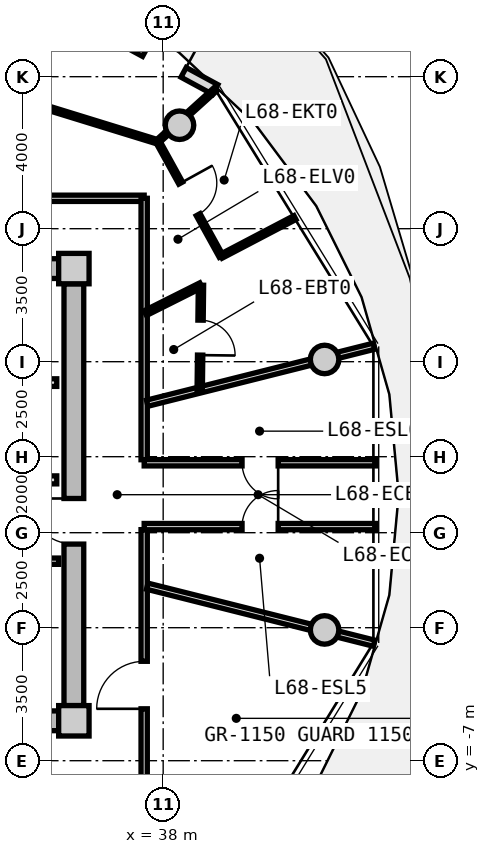
"""IFC4 building model, lengths in metres.
Left out: names, types, materials, properties, quantities, classifications, styles, units other than length and angle.
Written with IfcOpenShell. Run it as: python <this file> out.ifc"""

import sys

from ifc_helpers import new_model, si_unit, direction, frame, frame_2d, origin, origin_2d, place, context, subcontext, project, spatial, rectangle, circle, extrude, source, transform, mapped, element, fill, save


model = new_model("IFC4")
c1 = context("Model", 3, precision=1e-05, world=origin(), true_north=direction((0.0, 1.0)))
c2 = subcontext(c1, "Body", "Model", "MODEL_VIEW")
j1 = project(units=[si_unit("LENGTHUNIT", "METRE"), si_unit("PLANEANGLEUNIT", "RADIAN")], contexts=[c1])
p1 = place(None, origin())
s1 = spatial("IfcSite", under=j1, at=p1, CompositionType="ELEMENT")
p2 = place(p1, origin())
s2 = spatial("IfcBuilding", under=s1, at=p2, CompositionType="ELEMENT")
p3 = place(p2, frame((0.0, 0.0, 220.0)))
s3 = spatial("IfcBuildingStorey", under=s2, at=p3, CompositionType="ELEMENT", Elevation=220.0)
m1 = source(origin(), c2, "Body", "SweptSolid", [
    extrude(rectangle(XDim=0.8, YDim=0.8, at=origin_2d()), origin(), (0.0, 0.0, 1.0), 3.05),
])
for number, where, z_axis, x_axis in (
    (1, (35.65, -5.95, 0.0), (0.0, 0.0, 1.0), (1.0, 0.0, 0.0)),
    (2, (35.65, 5.95, 0.0), (0.0, 0.0, 1.0), (1.0, 0.0, 0.0)),
):
    element("IfcColumn", number, at=place(p3, frame(where, z_axis=z_axis, x_axis=x_axis)), inside=s3, PredefinedType="COLUMN", context=c2, shape_type="MappedRepresentation", body=[
        mapped(m1, transform((0.0, 0.0, 0.0), x_axis=(1.0, 0.0, 0.0), y_axis=(0.0, 1.0, 0.0), z_axis=(0.0, 0.0, 1.0), scale=1.0)),
    ])
m2 = source(origin(), c2, "Body", "SweptSolid", [
    extrude(rectangle(XDim=14.5, YDim=0.52, at=frame_2d((7.25, 0.0))), origin(), (0.0, 0.0, 1.0), 2.76),
])
for number, where, z_axis, x_axis in (
    (3, (20.75, 5.95, 0.0), (0.0, 0.0, 1.0), (1.0, 0.0, 0.0)),
    (4, (35.25, -5.95, 0.0), (0.0, 0.0, 1.0), (-1.0, 0.0, 0.0)),
):
    element("IfcWall", number, at=place(p3, frame(where, z_axis=z_axis, x_axis=x_axis)), inside=s3, PredefinedType="SHEAR", context=c2, shape_type="MappedRepresentation", body=[
        mapped(m2, transform((0.0, 0.0, 0.0), x_axis=(1.0, 0.0, 0.0), y_axis=(0.0, 1.0, 0.0), z_axis=(0.0, 0.0, 1.0), scale=1.0)),
    ])
m3 = source(origin(), c2, "Body", "SweptSolid", [
    extrude(rectangle(XDim=11.1, YDim=0.52, at=frame_2d((5.55, 0.0))), origin(), (0.0, 0.0, 1.0), 2.76),
])
p4 = place(p3, frame((35.65, 5.55, 0.0), z_axis=(0.0, 0.0, 1.0), x_axis=(0.0, -1.0, 0.0)))
e5 = element("IfcWall", 5, at=p4, inside=s3, PredefinedType="SHEAR", context=c2, shape_type="MappedRepresentation", body=[
    mapped(m3, transform((0.0, 0.0, 0.0), x_axis=(1.0, 0.0, 0.0), y_axis=(0.0, 1.0, 0.0), z_axis=(0.0, 0.0, 1.0), scale=1.0)),
])
p5 = place(p4, frame((5.65, 0.0, 0.0)))
e6 = element("IfcOpeningElement", 6, at=p5, cuts=e5, PredefinedType="OPENING", context=c2, shape_type="SweptSolid", body=[
    extrude(rectangle(XDim=1.2, YDim=2.15, at=frame_2d((0.6, 1.075))), frame((0.0, 0.27, 0.0), z_axis=(0.0, -1.0, 0.0), x_axis=(1.0, 0.0, 0.0)), (0.0, 0.0, 1.0), 0.54),
])
m4 = source(origin(), c2, "Body", "SweptSolid", [
    extrude(circle(Radius=0.375, at=origin_2d()), origin(), (0.0, 0.0, 1.0), 3.05),
])
for number, where, z_axis, x_axis in (
    (7, (42.247, 3.559, 0.0), (0.0, 0.0, 1.0), (1.0, 0.0, 0.0)),
    (8, (38.43, 9.723, 0.0), (0.0, 0.0, 1.0), (1.0, 0.0, 0.0)),
    (9, (42.247, -3.559, 0.0), (0.0, 0.0, 1.0), (1.0, 0.0, 0.0)),
):
    element("IfcColumn", number, at=place(p3, frame(where, z_axis=z_axis, x_axis=x_axis)), inside=s3, PredefinedType="COLUMN", context=c2, shape_type="MappedRepresentation", body=[
        mapped(m4, transform((0.0, 0.0, 0.0), x_axis=(1.0, 0.0, 0.0), y_axis=(0.0, 1.0, 0.0), z_axis=(0.0, 0.0, 1.0), scale=1.0)),
    ])
m5 = source(origin(), c2, "Body", "SweptSolid", [
    extrude(rectangle(XDim=8.197, YDim=0.29, at=frame_2d((4.099, 0.0))), origin(), (0.0, 0.0, 1.0), 2.76),
])
p6 = place(p3, frame((32.162, 14.566, 0.0), z_axis=(0.0, 0.0, 1.0), x_axis=(0.879369910001, -0.476139224791, 0.0)))
e10 = element("IfcWall", 10, at=p6, inside=s3, PredefinedType="SOLIDWALL", context=c2, shape_type="MappedRepresentation", body=[
    mapped(m5, transform((0.0, 0.0, 0.0), x_axis=(1.0, 0.0, 0.0), y_axis=(0.0, 1.0, 0.0), z_axis=(0.0, 0.0, 1.0), scale=1.0)),
])
p7 = place(p6, frame((6.1, 0.0, 0.0)))
e11 = element("IfcOpeningElement", 11, at=p7, cuts=e10, PredefinedType="OPENING", context=c2, shape_type="SweptSolid", body=[
    extrude(rectangle(XDim=1.15, YDim=2.25, at=frame_2d((0.575, 1.125))), frame((0.0, 0.155, 0.0), z_axis=(0.0, -1.0, 0.0), x_axis=(1.0, 0.0, 0.0)), (0.0, 0.0, 1.0), 0.31),
])
p8 = place(p6, frame((0.85, 0.0, 0.85)))
e12 = element("IfcOpeningElement", 12, at=p8, cuts=e10, PredefinedType="OPENING", context=c2, shape_type="SweptSolid", body=[
    extrude(rectangle(XDim=1.2, YDim=1.5, at=frame_2d((0.6, 0.75))), frame((0.0, 0.155, 0.0), z_axis=(0.0, -1.0, 0.0), x_axis=(1.0, 0.0, 0.0)), (0.0, 0.0, 1.0), 0.31),
])
m6 = source(origin(), c2, "Body", "SweptSolid", [
    extrude(rectangle(XDim=3.2, YDim=0.2, at=frame_2d((1.6, 0.0))), origin(), (0.0, 0.0, 1.0), 2.745),
])
p9 = place(p3, frame((32.0, 2.95, 0.0), z_axis=(0.0, 0.0, 1.0), x_axis=(1.0, 0.0, 0.0)))
e13 = element("IfcWall", 13, at=p9, inside=s3, PredefinedType="PARTITIONING", context=c2, shape_type="MappedRepresentation", body=[
    mapped(m6, transform((0.0, 0.0, 0.0), x_axis=(1.0, 0.0, 0.0), y_axis=(0.0, 1.0, 0.0), z_axis=(0.0, 0.0, 1.0), scale=1.0)),
])
m7 = source(origin(), c2, "Body", "SweptSolid", [
    extrude(rectangle(XDim=6.66, YDim=0.21, at=frame_2d((3.33, 0.0))), origin(), (0.0, 0.0, 1.0), 2.745),
])
p10 = place(p3, frame((28.54, 0.39, 0.0), z_axis=(0.0, 0.0, 1.0), x_axis=(1.0, 0.0, 0.0)))
e14 = element("IfcWall", 14, at=p10, inside=s3, PredefinedType="PARTITIONING", context=c2, shape_type="MappedRepresentation", body=[
    mapped(m7, transform((0.0, 0.0, 0.0), x_axis=(1.0, 0.0, 0.0), y_axis=(0.0, 1.0, 0.0), z_axis=(0.0, 0.0, 1.0), scale=1.0)),
])
p11 = place(p10, frame((1.0, 0.0, 0.0)))
e15 = element("IfcOpeningElement", 15, at=p11, cuts=e14, PredefinedType="OPENING", context=c2, shape_type="SweptSolid", body=[
    extrude(rectangle(XDim=1.2, YDim=2.15, at=frame_2d((0.6, 1.075))), frame((0.0, 0.115, 0.0), z_axis=(0.0, -1.0, 0.0), x_axis=(1.0, 0.0, 0.0)), (0.0, 0.0, 1.0), 0.23),
])
m8 = source(origin(), c2, "Body", "SweptSolid", [
    extrude(rectangle(XDim=2.7, YDim=0.165, at=frame_2d((1.35, 0.0))), origin(), (0.0, 0.0, 1.0), 2.745),
])
p12 = place(p3, frame((32.55, -1.75, 0.0), z_axis=(0.0, 0.0, 1.0), x_axis=(1.0, 0.0, 0.0)))
e16 = element("IfcWall", 16, at=p12, inside=s3, PredefinedType="PARTITIONING", context=c2, shape_type="MappedRepresentation", body=[
    mapped(m8, transform((0.0, 0.0, 0.0), x_axis=(1.0, 0.0, 0.0), y_axis=(0.0, 1.0, 0.0), z_axis=(0.0, 0.0, 1.0), scale=1.0)),
])
p13 = place(p12, frame((0.222, 0.0, 0.0)))
e17 = element("IfcOpeningElement", 17, at=p13, cuts=e16, PredefinedType="OPENING", context=c2, shape_type="SweptSolid", body=[
    extrude(rectangle(XDim=0.925, YDim=2.1, at=frame_2d((0.462, 1.05))), frame((0.0, 0.093, 0.0), z_axis=(0.0, -1.0, 0.0), x_axis=(1.0, 0.0, 0.0)), (0.0, 0.0, 1.0), 0.185),
])
p14 = place(p12, frame((1.522, 0.0, 0.0)))
e18 = element("IfcOpeningElement", 18, at=p14, cuts=e16, PredefinedType="OPENING", context=c2, shape_type="SweptSolid", body=[
    extrude(rectangle(XDim=0.925, YDim=2.1, at=frame_2d((0.462, 1.05))), frame((0.0, 0.093, 0.0), z_axis=(0.0, -1.0, 0.0), x_axis=(1.0, 0.0, 0.0)), (0.0, 0.0, 1.0), 0.185),
])
m9 = source(origin(), c2, "Body", "SweptSolid", [
    extrude(rectangle(XDim=8.58, YDim=0.165, at=frame_2d((4.29, 0.0))), origin(), (0.0, 0.0, 1.0), 2.745),
])
p15 = place(p3, frame((28.92, 7.8, 0.0), z_axis=(0.0, 0.0, 1.0), x_axis=(1.0, 0.0, 0.0)))
e19 = element("IfcWall", 19, at=p15, inside=s3, PredefinedType="PARTITIONING", context=c2, shape_type="MappedRepresentation", body=[
    mapped(m9, transform((0.0, 0.0, 0.0), x_axis=(1.0, 0.0, 0.0), y_axis=(0.0, 1.0, 0.0), z_axis=(0.0, 0.0, 1.0), scale=1.0)),
])
p16 = place(p15, frame((4.32, 0.0, 0.0)))
e20 = element("IfcOpeningElement", 20, at=p16, cuts=e19, PredefinedType="OPENING", context=c2, shape_type="SweptSolid", body=[
    extrude(rectangle(XDim=1.05, YDim=2.15, at=frame_2d((0.525, 1.075))), frame((0.0, 0.093, 0.0), z_axis=(0.0, -1.0, 0.0), x_axis=(1.0, 0.0, 0.0)), (0.0, 0.0, 1.0), 0.185),
])
m10 = source(origin(), c2, "Body", "SweptSolid", [
    extrude(rectangle(XDim=6.88, YDim=0.165, at=frame_2d((3.44, 0.0))), origin(), (0.0, 0.0, 1.0), 2.745),
])
p17 = place(p3, frame((37.5, 7.8, 0.0), z_axis=(0.0, 0.0, 1.0), x_axis=(0.0, -1.0, 0.0)))
e21 = element("IfcWall", 21, at=p17, inside=s3, PredefinedType="PARTITIONING", context=c2, shape_type="MappedRepresentation", body=[
    mapped(m10, transform((0.0, 0.0, 0.0), x_axis=(1.0, 0.0, 0.0), y_axis=(0.0, 1.0, 0.0), z_axis=(0.0, 0.0, 1.0), scale=1.0)),
])
p18 = place(p3, frame((37.5, -0.92, 0.0), z_axis=(0.0, 0.0, 1.0), x_axis=(0.0, -1.0, 0.0)))
e22 = element("IfcWall", 22, at=p18, inside=s3, PredefinedType="PARTITIONING", context=c2, shape_type="MappedRepresentation", body=[
    mapped(m10, transform((0.0, 0.0, 0.0), x_axis=(1.0, 0.0, 0.0), y_axis=(0.0, 1.0, 0.0), z_axis=(0.0, 0.0, 1.0), scale=1.0)),
])
p19 = place(p18, frame((3.464, 0.0, 0.0)))
e23 = element("IfcOpeningElement", 23, at=p19, cuts=e22, PredefinedType="OPENING", context=c2, shape_type="SweptSolid", body=[
    extrude(rectangle(XDim=1.25, YDim=2.2, at=frame_2d((0.625, 1.1))), frame((0.0, 0.093, 0.0), z_axis=(0.0, -1.0, 0.0), x_axis=(1.0, 0.0, 0.0)), (0.0, 0.0, 1.0), 0.185),
])
m11 = source(origin(), c2, "Body", "SweptSolid", [
    extrude(rectangle(XDim=6.157, YDim=0.165, at=frame_2d((3.079, 0.0))), origin(), (0.0, 0.0, 1.0), 2.345),
])
for number, where, z_axis, x_axis in (
    (24, (37.58, -2.407, 0.0), (0.0, 0.0, 1.0), (0.97, -0.244, 0.0)),
    (25, (37.58, 2.407, 0.0), (0.0, 0.0, 1.0), (0.97, 0.244, 0.0)),
):
    element("IfcWall", number, at=place(p3, frame(where, z_axis=z_axis, x_axis=x_axis)), inside=s3, PredefinedType="PARTITIONING", context=c2, shape_type="MappedRepresentation", body=[
        mapped(m11, transform((0.0, 0.0, 0.0), x_axis=(1.0, 0.0, 0.0), y_axis=(0.0, 1.0, 0.0), z_axis=(0.0, 0.0, 1.0), scale=1.0)),
    ])
m12 = source(origin(), c2, "Body", "SweptSolid", [
    extrude(rectangle(XDim=6.101, YDim=0.165, at=frame_2d((3.051, 0.0))), origin(), (0.0, 0.0, 1.0), 2.745),
])
p20 = place(p3, frame((37.5, 0.84, 0.0), z_axis=(0.0, 0.0, 1.0), x_axis=(1.0, 0.0, 0.0)))
e26 = element("IfcWall", 26, at=p20, inside=s3, PredefinedType="PARTITIONING", context=c2, shape_type="MappedRepresentation", body=[
    mapped(m12, transform((0.0, 0.0, 0.0), x_axis=(1.0, 0.0, 0.0), y_axis=(0.0, 1.0, 0.0), z_axis=(0.0, 0.0, 1.0), scale=1.0)),
])
p21 = place(p20, frame((2.576, 0.0, 0.0)))
e27 = element("IfcOpeningElement", 27, at=p21, cuts=e26, PredefinedType="OPENING", context=c2, shape_type="SweptSolid", body=[
    extrude(rectangle(XDim=0.95, YDim=2.1, at=frame_2d((0.475, 1.05))), frame((0.0, 0.093, 0.0), z_axis=(0.0, -1.0, 0.0), x_axis=(1.0, 0.0, 0.0)), (0.0, 0.0, 1.0), 0.185),
])
p22 = place(p3, frame((43.601, -0.84, 0.0), z_axis=(0.0, 0.0, 1.0), x_axis=(-1.0, 0.0, 0.0)))
e28 = element("IfcWall", 28, at=p22, inside=s3, PredefinedType="PARTITIONING", context=c2, shape_type="MappedRepresentation", body=[
    mapped(m12, transform((0.0, 0.0, 0.0), x_axis=(1.0, 0.0, 0.0), y_axis=(0.0, 1.0, 0.0), z_axis=(0.0, 0.0, 1.0), scale=1.0)),
])
p23 = place(p22, frame((2.576, 0.0, 0.0)))
e29 = element("IfcOpeningElement", 29, at=p23, cuts=e28, PredefinedType="OPENING", context=c2, shape_type="SweptSolid", body=[
    extrude(rectangle(XDim=0.95, YDim=2.1, at=frame_2d((0.475, 1.05))), frame((0.0, 0.093, 0.0), z_axis=(0.0, -1.0, 0.0), x_axis=(1.0, 0.0, 0.0)), (0.0, 0.0, 1.0), 0.185),
])
m13 = source(origin(), c2, "Body", "SweptSolid", [
    extrude(rectangle(XDim=6.919, YDim=0.115, at=frame_2d((3.459, 0.0))), origin(), (0.0, 0.0, 1.0), 2.745),
])
p24 = place(p3, frame((37.849, 9.287, 0.0), z_axis=(0.0, 0.0, 1.0), x_axis=(-0.955678249072, 0.294413118341, 0.0)))
e30 = element("IfcWall", 30, at=p24, inside=s3, PredefinedType="PARTITIONING", context=c2, shape_type="MappedRepresentation", body=[
    mapped(m13, transform((0.0, 0.0, 0.0), x_axis=(1.0, 0.0, 0.0), y_axis=(0.0, 1.0, 0.0), z_axis=(0.0, 0.0, 1.0), scale=1.0)),
])
p25 = place(p24, frame((2.985, 0.0, 0.0)))
e31 = element("IfcOpeningElement", 31, at=p25, cuts=e30, PredefinedType="OPENING", context=c2, shape_type="SweptSolid", body=[
    extrude(rectangle(XDim=0.95, YDim=2.1, at=frame_2d((0.475, 1.05))), frame((0.0, 0.067, 0.0), z_axis=(0.0, -1.0, 0.0), x_axis=(1.0, 0.0, 0.0)), (0.0, 0.0, 1.0), 0.135),
])
m14 = source(origin(), c2, "Body", "SweptSolid", [
    extrude(rectangle(XDim=2.072, YDim=0.115, at=frame_2d((1.036, 0.0))), origin(), (0.0, 0.0, 1.0), 2.385),
])
p26 = place(p3, frame((37.849, 9.287, 0.0), z_axis=(0.0, 0.0, 1.0), x_axis=(0.741410125356, 0.671052178314, 0.0)))
e32 = element("IfcWall", 32, at=p26, inside=s3, PredefinedType="PARTITIONING", context=c2, shape_type="MappedRepresentation", body=[
    mapped(m14, transform((0.0, 0.0, 0.0), x_axis=(1.0, 0.0, 0.0), y_axis=(0.0, 1.0, 0.0), z_axis=(0.0, 0.0, 1.0), scale=1.0)),
])
m15 = source(origin(), c2, "Body", "SweptSolid", [
    extrude(rectangle(XDim=1.638, YDim=0.14, at=frame_2d((0.819, 0.0))), origin(), (0.0, 0.0, 1.0), 2.745),
])
p27 = place(p3, frame((37.53, 4.778, 0.0), z_axis=(0.0, 0.0, 1.0), x_axis=(0.893919977945, 0.448226586707, 0.0)))
e33 = element("IfcWall", 33, at=p27, inside=s3, PredefinedType="PARTITIONING", context=c2, shape_type="MappedRepresentation", body=[
    mapped(m15, transform((0.0, 0.0, 0.0), x_axis=(1.0, 0.0, 0.0), y_axis=(0.0, 1.0, 0.0), z_axis=(0.0, 0.0, 1.0), scale=1.0)),
])
m16 = source(origin(), c2, "Body", "SweptSolid", [
    extrude(rectangle(XDim=2.759, YDim=0.14, at=frame_2d((1.379, 0.0))), origin(), (0.0, 0.0, 1.0), 2.745),
])
p28 = place(p3, frame((38.995, 5.513, 0.0), z_axis=(0.0, 0.0, 1.0), x_axis=(-0.01194710728, -0.999928630767, 0.0)))
e34 = element("IfcWall", 34, at=p28, inside=s3, PredefinedType="PARTITIONING", context=c2, shape_type="MappedRepresentation", body=[
    mapped(m16, transform((0.0, 0.0, 0.0), x_axis=(1.0, 0.0, 0.0), y_axis=(0.0, 1.0, 0.0), z_axis=(0.0, 0.0, 1.0), scale=1.0)),
])
p29 = place(p28, frame((0.919, 0.0, 0.0)))
e35 = element("IfcOpeningElement", 35, at=p29, cuts=e34, PredefinedType="OPENING", context=c2, shape_type="SweptSolid", body=[
    extrude(rectangle(XDim=0.92, YDim=2.1, at=frame_2d((0.46, 1.05))), frame((0.0, 0.08, 0.0), z_axis=(0.0, -1.0, 0.0), x_axis=(1.0, 0.0, 0.0)), (0.0, 0.0, 1.0), 0.16),
])
m17 = source(origin(), c2, "Body", "SweptSolid", [
    extrude(rectangle(XDim=2.193, YDim=0.115, at=frame_2d((1.097, 0.0))), origin(), (0.0, 0.0, 1.0), 2.745),
])
p30 = place(p3, frame((39.525, 6.275, 0.0), z_axis=(0.0, 0.0, 1.0), x_axis=(0.885783595046, 0.464098505435, 0.0)))
e36 = element("IfcWall", 36, at=p30, inside=s3, PredefinedType="PARTITIONING", context=c2, shape_type="MappedRepresentation", body=[
    mapped(m17, transform((0.0, 0.0, 0.0), x_axis=(1.0, 0.0, 0.0), y_axis=(0.0, 1.0, 0.0), z_axis=(0.0, 0.0, 1.0), scale=1.0)),
])
m18 = source(origin(), c2, "Body", "SweptSolid", [
    extrude(rectangle(XDim=3.45, YDim=0.115, at=frame_2d((1.725, 0.0))), origin(), (0.0, 0.0, 1.0), 2.745),
])
p31 = place(p3, frame((39.525, 6.275, 0.0), z_axis=(0.0, 0.0, 1.0), x_axis=(-0.483659007882, 0.875256513312, 0.0)))
e37 = element("IfcWall", 37, at=p31, inside=s3, PredefinedType="PARTITIONING", context=c2, shape_type="MappedRepresentation", body=[
    mapped(m18, transform((0.0, 0.0, 0.0), x_axis=(1.0, 0.0, 0.0), y_axis=(0.0, 1.0, 0.0), z_axis=(0.0, 0.0, 1.0), scale=1.0)),
])
p32 = place(p31, frame((1.25, 0.0, 0.0)))
e38 = element("IfcOpeningElement", 38, at=p32, cuts=e37, PredefinedType="OPENING", context=c2, shape_type="SweptSolid", body=[
    extrude(rectangle(XDim=0.95, YDim=2.1, at=frame_2d((0.475, 1.05))), frame((0.0, 0.067, 0.0), z_axis=(0.0, -1.0, 0.0), x_axis=(1.0, 0.0, 0.0)), (0.0, 0.0, 1.0), 0.135),
])
m19 = source(origin(), c2, "Body", "SweptSolid", [
    extrude(rectangle(XDim=1.15, YDim=2.25, at=frame_2d((0.575, 1.125))), frame((0.0, 0.025, 0.0), z_axis=(0.0, -1.0, 0.0), x_axis=(1.0, 0.0, 0.0)), (0.0, 0.0, 1.0), 0.05),
])
p33 = place(p7, origin())
e39 = element("IfcDoor", 39, at=p33, inside=s3, OperationType="SINGLE_SWING_RIGHT", PredefinedType="DOOR", context=c2, shape_type="MappedRepresentation", body=[
    mapped(m19, transform((0.0, 0.0, 0.0), x_axis=(1.0, 0.0, 0.0), y_axis=(0.0, 1.0, 0.0), z_axis=(0.0, 0.0, 1.0), scale=1.0)),
])
fill(e11, e39)
m20 = source(origin(), c2, "Body", "SweptSolid", [
    extrude(rectangle(XDim=1.2, YDim=2.15, at=frame_2d((0.6, 1.075))), frame((0.0, 0.025, 0.0), z_axis=(0.0, -1.0, 0.0), x_axis=(1.0, 0.0, 0.0)), (0.0, 0.0, 1.0), 0.05),
])
p34 = place(p5, frame((1.2, 0.0, 0.0), z_axis=(0.0, 0.0, 1.0), x_axis=(-1.0, 0.0, 0.0)))
e40 = element("IfcDoor", 40, at=p34, inside=s3, OperationType="SINGLE_SWING_RIGHT", PredefinedType="DOOR", context=c2, shape_type="MappedRepresentation", body=[
    mapped(m20, transform((0.0, 0.0, 0.0), x_axis=(1.0, 0.0, 0.0), y_axis=(0.0, 1.0, 0.0), z_axis=(0.0, 0.0, 1.0), scale=1.0)),
])
fill(e6, e40)
m21 = source(origin(), c2, "Body", "SweptSolid", [
    extrude(rectangle(XDim=0.95, YDim=2.1, at=frame_2d((0.475, 1.05))), frame((0.0, 0.025, 0.0), z_axis=(0.0, -1.0, 0.0), x_axis=(1.0, 0.0, 0.0)), (0.0, 0.0, 1.0), 0.05),
])
p35 = place(p23, frame((0.95, 0.0, 0.0), z_axis=(0.0, 0.0, 1.0), x_axis=(-1.0, 0.0, 0.0)))
e41 = element("IfcDoor", 41, at=p35, inside=s3, OperationType="SINGLE_SWING_RIGHT", PredefinedType="DOOR", context=c2, shape_type="MappedRepresentation", body=[
    mapped(m21, transform((0.0, 0.0, 0.0), x_axis=(1.0, 0.0, 0.0), y_axis=(0.0, 1.0, 0.0), z_axis=(0.0, 0.0, 1.0), scale=1.0)),
])
fill(e29, e41)
p36 = place(p21, frame((0.95, 0.0, 0.0), z_axis=(0.0, 0.0, 1.0), x_axis=(-1.0, 0.0, 0.0)))
e42 = element("IfcDoor", 42, at=p36, inside=s3, OperationType="SINGLE_SWING_LEFT", PredefinedType="DOOR", context=c2, shape_type="MappedRepresentation", body=[
    mapped(m21, transform((0.0, 0.0, 0.0), x_axis=(1.0, 0.0, 0.0), y_axis=(0.0, 1.0, 0.0), z_axis=(0.0, 0.0, 1.0), scale=1.0)),
])
fill(e27, e42)
m22 = source(origin(), c2, "Body", "SweptSolid", [
    extrude(rectangle(XDim=0.92, YDim=2.1, at=frame_2d((0.46, 1.05))), frame((0.0, 0.025, 0.0), z_axis=(0.0, -1.0, 0.0), x_axis=(1.0, 0.0, 0.0)), (0.0, 0.0, 1.0), 0.05),
])
p37 = place(p29, origin())
e43 = element("IfcDoor", 43, at=p37, inside=s3, OperationType="SINGLE_SWING_RIGHT", PredefinedType="DOOR", context=c2, shape_type="MappedRepresentation", body=[
    mapped(m22, transform((0.0, 0.0, 0.0), x_axis=(1.0, 0.0, 0.0), y_axis=(0.0, 1.0, 0.0), z_axis=(0.0, 0.0, 1.0), scale=1.0)),
])
fill(e35, e43)
p38 = place(p32, frame((0.95, 0.0, 0.0), z_axis=(0.0, 0.0, 1.0), x_axis=(-1.0, 0.0, 0.0)))
e44 = element("IfcDoor", 44, at=p38, inside=s3, OperationType="SINGLE_SWING_LEFT", PredefinedType="DOOR", context=c2, shape_type="MappedRepresentation", body=[
    mapped(m21, transform((0.0, 0.0, 0.0), x_axis=(1.0, 0.0, 0.0), y_axis=(0.0, 1.0, 0.0), z_axis=(0.0, 0.0, 1.0), scale=1.0)),
])
fill(e38, e44)
m23 = source(origin(), c2, "Body", "SweptSolid", [
    extrude(rectangle(XDim=1.25, YDim=2.2, at=frame_2d((0.625, 1.1))), frame((0.0, 0.025, 0.0), z_axis=(0.0, -1.0, 0.0), x_axis=(1.0, 0.0, 0.0)), (0.0, 0.0, 1.0), 0.05),
])
p39 = place(p19, frame((1.25, 0.0, 0.0), z_axis=(0.0, 0.0, 1.0), x_axis=(-1.0, 0.0, 0.0)))
e45 = element("IfcDoor", 45, at=p39, inside=s3, OperationType="SINGLE_SWING_LEFT", PredefinedType="DOOR", context=c2, shape_type="MappedRepresentation", body=[
    mapped(m23, transform((0.0, 0.0, 0.0), x_axis=(1.0, 0.0, 0.0), y_axis=(0.0, 1.0, 0.0), z_axis=(0.0, 0.0, 1.0), scale=1.0)),
])
fill(e23, e45)
save(model, sys.argv[1])
